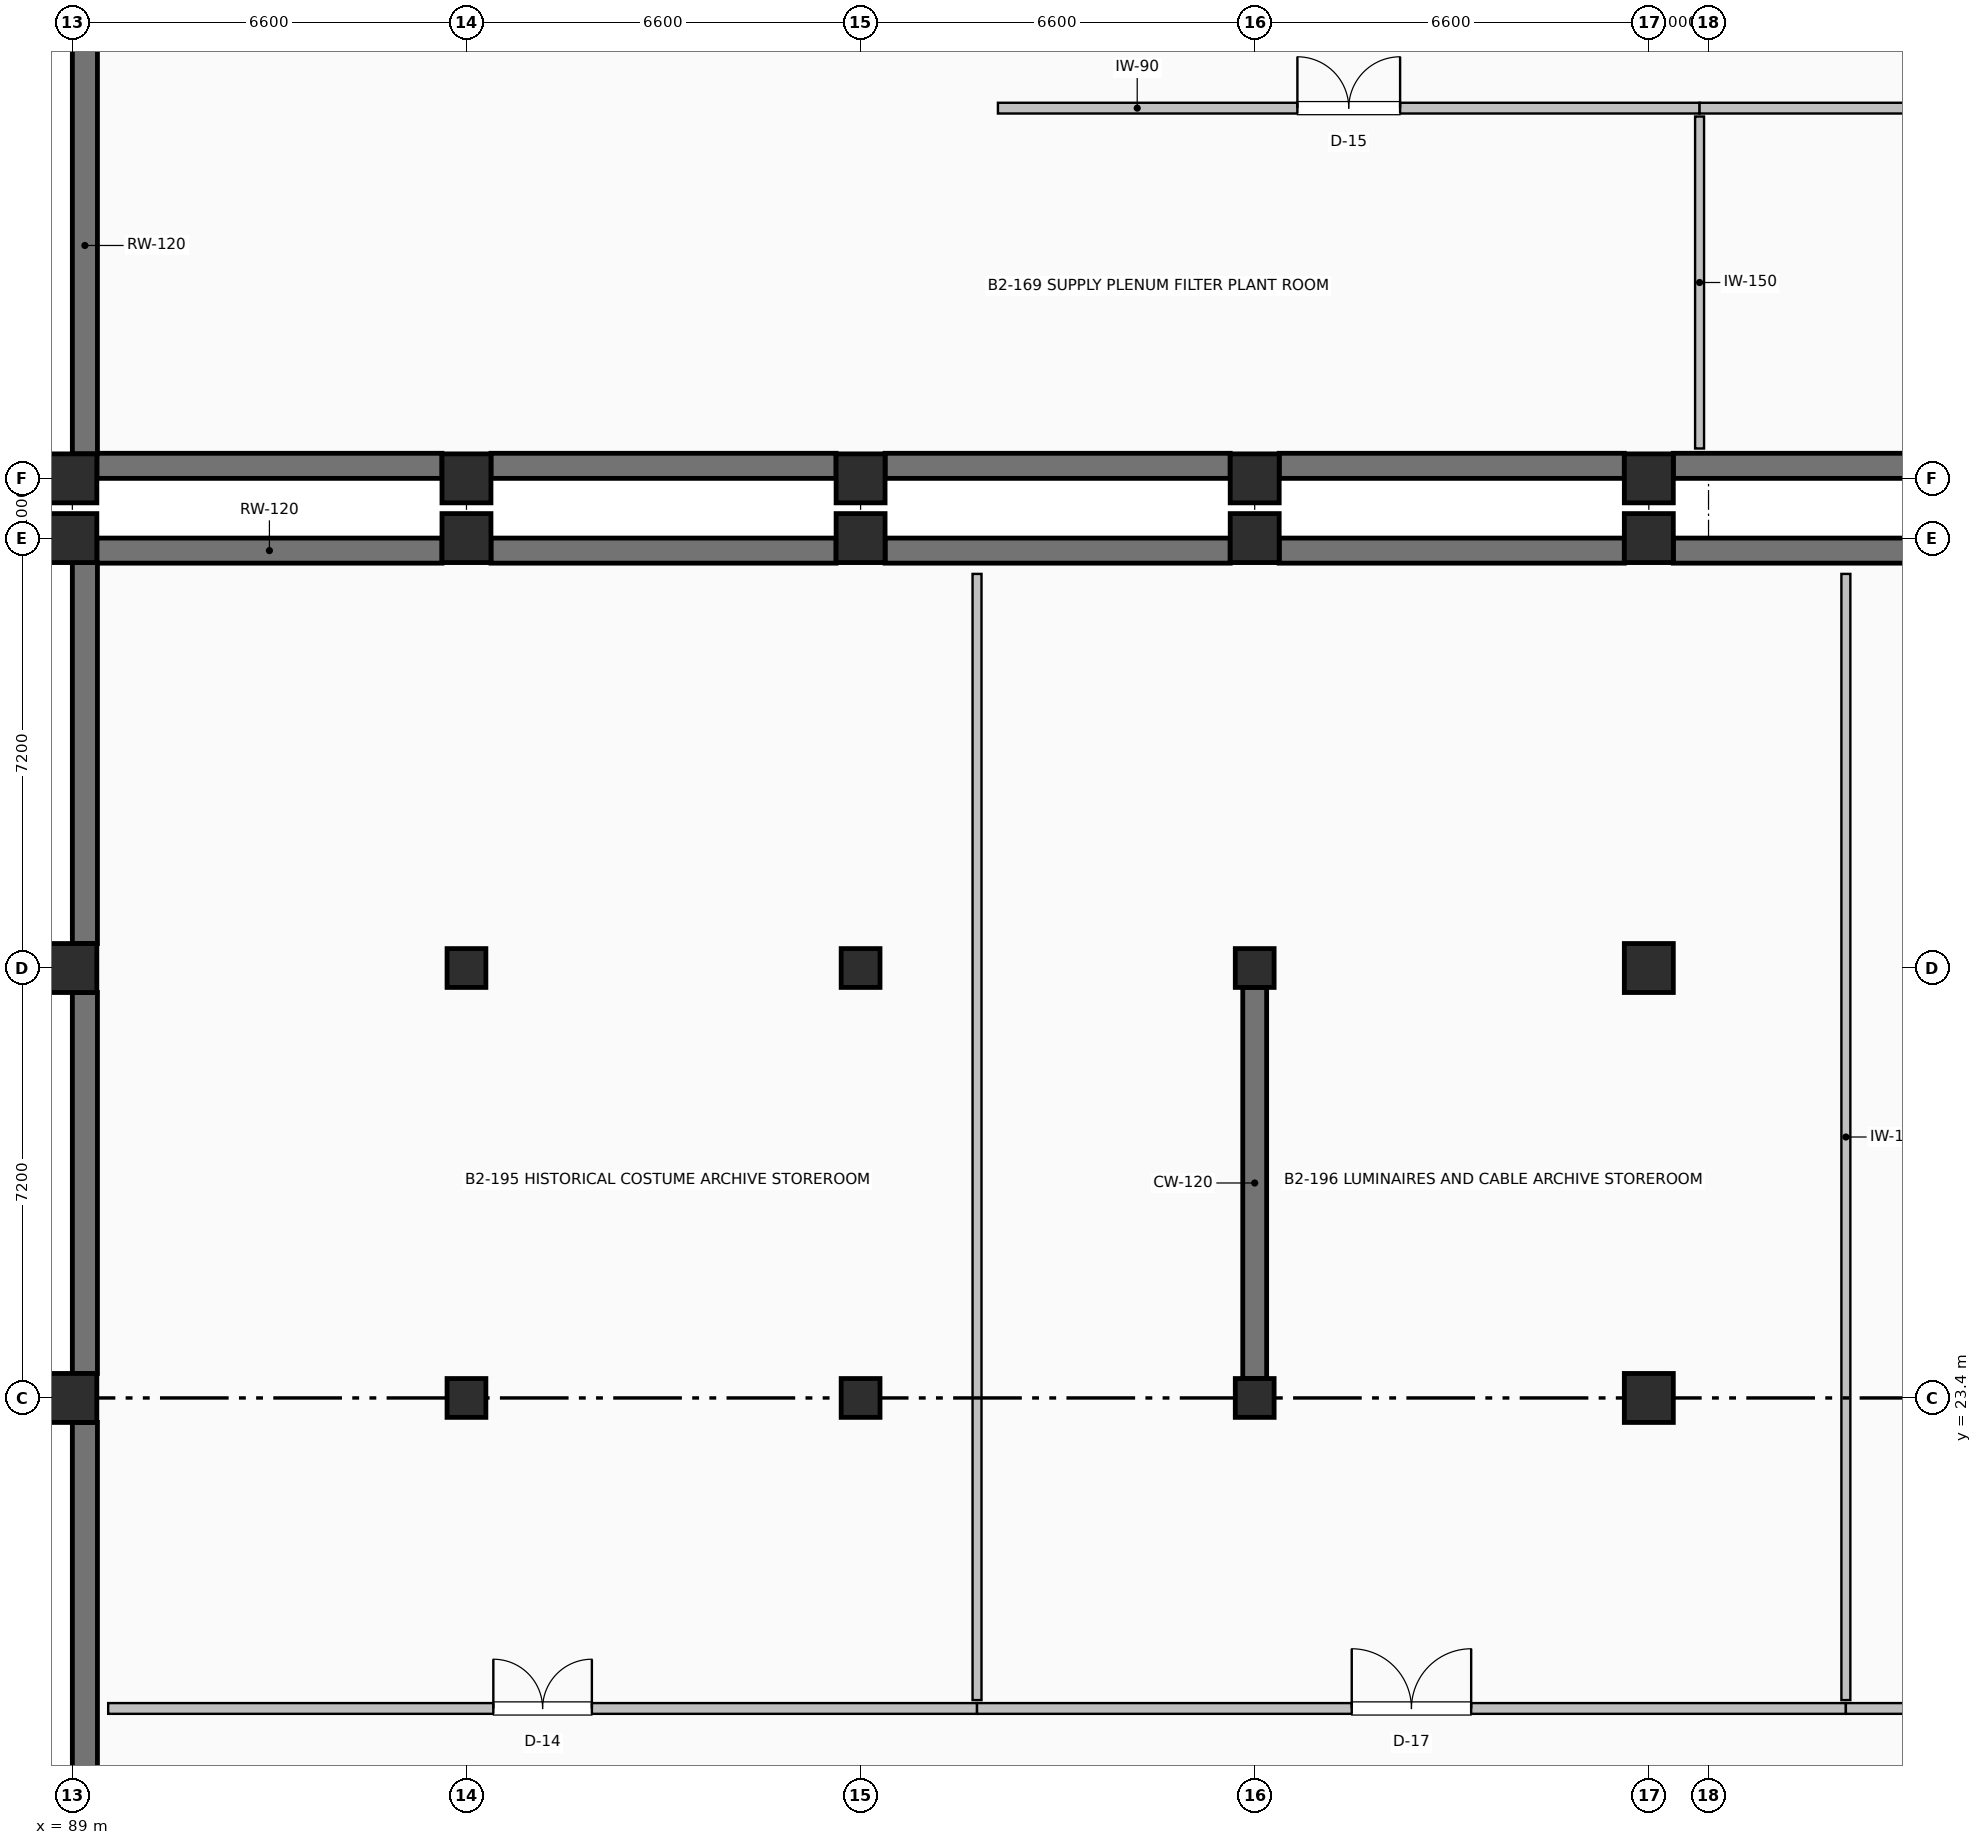
"""IFC4 building model, lengths in metres.
Left out: names, types, materials, properties, quantities, classifications, styles, units other than length and angle.
Written with IfcOpenShell. Run it as: python <this file> out.ifc"""

import sys

from ifc_helpers import new_model, si_unit, direction, frame, frame_2d, origin, origin_2d, place, context, subcontext, project, spatial, rectangle, extrude, element, fill, save


model = new_model("IFC4")
c1 = context("Model", 3, precision=1e-05, world=origin(), true_north=direction((0.0, 1.0)))
c2 = subcontext(c1, "Body", "Model", "MODEL_VIEW")
j1 = project(units=[si_unit("LENGTHUNIT", "METRE"), si_unit("PLANEANGLEUNIT", "RADIAN")], contexts=[c1])
p1 = place(None, origin())
s1 = spatial("IfcSite", under=j1, at=p1, CompositionType="ELEMENT")
p2 = place(p1, origin())
s2 = spatial("IfcBuilding", under=s1, at=p2, CompositionType="ELEMENT")
p3 = place(p2, frame((0.0, 0.0, -9.6)))
s3 = spatial("IfcBuildingStorey", under=s2, at=p3, CompositionType="ELEMENT", Elevation=-9.6)
for number, where, z_axis, x_axis in (
    (1, (89.0, 38.8, 0.0), (0.0, 0.0, 1.0), (1.0, 0.0, 0.0)),
    (2, (95.6, 38.8, 0.0), (0.0, 0.0, 1.0), (1.0, 0.0, 0.0)),
    (3, (102.2, 38.8, 0.0), (0.0, 0.0, 1.0), (1.0, 0.0, 0.0)),
    (4, (108.8, 38.8, 0.0), (0.0, 0.0, 1.0), (1.0, 0.0, 0.0)),
    (5, (115.4, 38.8, 0.0), (0.0, 0.0, 1.0), (1.0, 0.0, 0.0)),
    (6, (89.0, 23.4, 0.0), (0.0, 0.0, 1.0), (1.0, 0.0, 0.0)),
    (7, (89.0, 30.6, 0.0), (0.0, 0.0, 1.0), (1.0, 0.0, 0.0)),
    (8, (89.0, 37.8, 0.0), (0.0, 0.0, 1.0), (1.0, 0.0, 0.0)),
):
    element("IfcColumn", number, at=place(p3, frame(where, z_axis=z_axis, x_axis=x_axis)), inside=s3, PredefinedType="COLUMN", context=c2, shape_type="SweptSolid", body=[
        extrude(rectangle(XDim=0.82, YDim=0.82, at=origin_2d()), origin(), (0.0, 0.0, 1.0), 4.8),
    ])
for number, where, z_axis, x_axis in (
    (9, (95.6, 23.4, 0.0), (0.0, 0.0, 1.0), (1.0, 0.0, 0.0)),
    (10, (95.6, 30.6, 0.0), (0.0, 0.0, 1.0), (1.0, 0.0, 0.0)),
):
    element("IfcColumn", number, at=place(p3, frame(where, z_axis=z_axis, x_axis=x_axis)), inside=s3, PredefinedType="COLUMN", context=c2, shape_type="SweptSolid", body=[
        extrude(rectangle(XDim=0.65, YDim=0.65, at=origin_2d()), origin(), (0.0, 0.0, 1.0), 4.8),
    ])
p4 = place(p3, frame((95.6, 37.8, 0.0), z_axis=(0.0, 0.0, 1.0), x_axis=(1.0, 0.0, 0.0)))
e11 = element("IfcColumn", 11, at=p4, inside=s3, PredefinedType="COLUMN", context=c2, shape_type="SweptSolid", body=[
    extrude(rectangle(XDim=0.82, YDim=0.82, at=origin_2d()), origin(), (0.0, 0.0, 1.0), 4.8),
])
for number, where, z_axis, x_axis in (
    (12, (102.2, 23.4, 0.0), (0.0, 0.0, 1.0), (1.0, 0.0, 0.0)),
    (13, (102.2, 30.6, 0.0), (0.0, 0.0, 1.0), (1.0, 0.0, 0.0)),
):
    element("IfcColumn", number, at=place(p3, frame(where, z_axis=z_axis, x_axis=x_axis)), inside=s3, PredefinedType="COLUMN", context=c2, shape_type="SweptSolid", body=[
        extrude(rectangle(XDim=0.65, YDim=0.65, at=origin_2d()), origin(), (0.0, 0.0, 1.0), 4.8),
    ])
p5 = place(p3, frame((102.2, 37.8, 0.0), z_axis=(0.0, 0.0, 1.0), x_axis=(1.0, 0.0, 0.0)))
e14 = element("IfcColumn", 14, at=p5, inside=s3, PredefinedType="COLUMN", context=c2, shape_type="SweptSolid", body=[
    extrude(rectangle(XDim=0.82, YDim=0.82, at=origin_2d()), origin(), (0.0, 0.0, 1.0), 4.8),
])
for number, where, z_axis, x_axis in (
    (15, (108.8, 23.4, 0.0), (0.0, 0.0, 1.0), (1.0, 0.0, 0.0)),
    (16, (108.8, 30.6, 0.0), (0.0, 0.0, 1.0), (1.0, 0.0, 0.0)),
):
    element("IfcColumn", number, at=place(p3, frame(where, z_axis=z_axis, x_axis=x_axis)), inside=s3, PredefinedType="COLUMN", context=c2, shape_type="SweptSolid", body=[
        extrude(rectangle(XDim=0.65, YDim=0.65, at=origin_2d()), origin(), (0.0, 0.0, 1.0), 4.8),
    ])
for number, where, z_axis, x_axis in (
    (17, (108.8, 37.8, 0.0), (0.0, 0.0, 1.0), (1.0, 0.0, 0.0)),
    (18, (115.4, 23.4, 0.0), (0.0, 0.0, 1.0), (1.0, 0.0, 0.0)),
    (19, (115.4, 30.6, 0.0), (0.0, 0.0, 1.0), (1.0, 0.0, 0.0)),
    (20, (115.4, 37.8, 0.0), (0.0, 0.0, 1.0), (1.0, 0.0, 0.0)),
):
    element("IfcColumn", number, at=place(p3, frame(where, z_axis=z_axis, x_axis=x_axis)), inside=s3, PredefinedType="COLUMN", context=c2, shape_type="SweptSolid", body=[
        extrude(rectangle(XDim=0.82, YDim=0.82, at=origin_2d()), origin(), (0.0, 0.0, 1.0), 4.8),
    ])
p6 = place(p3, frame((108.8, 23.725, 0.0), z_axis=(0.0, 0.0, 1.0), x_axis=(0.0, 1.0, 0.0)))
e21 = element("IfcWall", 21, at=p6, inside=s3, PredefinedType="SHEAR", context=c2, shape_type="SweptSolid", body=[
    extrude(rectangle(XDim=6.55, YDim=0.4, at=frame_2d((3.275, 0.0))), origin(), (0.0, 0.0, 1.0), 4.48),
])
for number, where, z_axis, x_axis in (
    (22, (121.59, 39.01, 0.0), (0.0, 0.0, 1.0), (-1.0, 0.0, 0.0)),
    (23, (114.99, 39.01, 0.0), (0.0, 0.0, 1.0), (-1.0, 0.0, 0.0)),
):
    element("IfcWall", number, at=place(p3, frame(where, z_axis=z_axis, x_axis=x_axis)), inside=s3, PredefinedType="SHEAR", context=c2, shape_type="SweptSolid", body=[
        extrude(rectangle(XDim=5.78, YDim=0.42, at=frame_2d((2.89, 0.0))), origin(), (0.0, 0.0, 1.0), 4.5),
    ])
p7 = place(p3, frame((108.39, 39.01, 0.0), z_axis=(0.0, 0.0, 1.0), x_axis=(-1.0, 0.0, 0.0)))
e24 = element("IfcWall", 24, at=p7, inside=s3, PredefinedType="SHEAR", context=c2, shape_type="SweptSolid", body=[
    extrude(rectangle(XDim=5.78, YDim=0.42, at=frame_2d((2.89, 0.0))), origin(), (0.0, 0.0, 1.0), 4.5),
])
for number, where, z_axis, x_axis in (
    (25, (101.79, 39.01, 0.0), (0.0, 0.0, 1.0), (-1.0, 0.0, 0.0)),
    (26, (95.19, 39.01, 0.0), (0.0, 0.0, 1.0), (-1.0, 0.0, 0.0)),
):
    element("IfcWall", number, at=place(p3, frame(where, z_axis=z_axis, x_axis=x_axis)), inside=s3, PredefinedType="SHEAR", context=c2, shape_type="SweptSolid", body=[
        extrude(rectangle(XDim=5.78, YDim=0.42, at=frame_2d((2.89, 0.0))), origin(), (0.0, 0.0, 1.0), 4.5),
    ])
p8 = place(p3, frame((89.21, 39.21, 0.0), z_axis=(0.0, 0.0, 1.0), x_axis=(0.0, 1.0, 0.0)))
e27 = element("IfcWall", 27, at=p8, inside=s3, PredefinedType="SHEAR", context=c2, shape_type="SweptSolid", body=[
    extrude(rectangle(XDim=6.98, YDim=0.42, at=frame_2d((3.49, 0.0))), origin(), (0.0, 0.0, 1.0), 4.5),
])
for number, where, z_axis, x_axis in (
    (28, (89.41, 37.59, 0.0), (0.0, 0.0, 1.0), (1.0, 0.0, 0.0)),
    (29, (96.01, 37.59, 0.0), (0.0, 0.0, 1.0), (1.0, 0.0, 0.0)),
):
    element("IfcWall", number, at=place(p3, frame(where, z_axis=z_axis, x_axis=x_axis)), inside=s3, PredefinedType="SHEAR", context=c2, shape_type="SweptSolid", body=[
        extrude(rectangle(XDim=5.78, YDim=0.42, at=frame_2d((2.89, 0.0))), origin(), (0.0, 0.0, 1.0), 4.5),
    ])
p9 = place(p3, frame((102.61, 37.59, 0.0), z_axis=(0.0, 0.0, 1.0), x_axis=(1.0, 0.0, 0.0)))
e30 = element("IfcWall", 30, at=p9, inside=s3, PredefinedType="SHEAR", context=c2, shape_type="SweptSolid", body=[
    extrude(rectangle(XDim=5.78, YDim=0.42, at=frame_2d((2.89, 0.0))), origin(), (0.0, 0.0, 1.0), 4.5),
])
for number, where, z_axis, x_axis in (
    (31, (109.21, 37.59, 0.0), (0.0, 0.0, 1.0), (1.0, 0.0, 0.0)),
    (32, (115.81, 37.59, 0.0), (0.0, 0.0, 1.0), (1.0, 0.0, 0.0)),
):
    element("IfcWall", number, at=place(p3, frame(where, z_axis=z_axis, x_axis=x_axis)), inside=s3, PredefinedType="SHEAR", context=c2, shape_type="SweptSolid", body=[
        extrude(rectangle(XDim=5.78, YDim=0.42, at=frame_2d((2.89, 0.0))), origin(), (0.0, 0.0, 1.0), 4.5),
    ])
for number, where, z_axis, x_axis in (
    (33, (89.21, 16.61, 0.0), (0.0, 0.0, 1.0), (0.0, 1.0, 0.0)),
    (34, (89.21, 23.81, 0.0), (0.0, 0.0, 1.0), (0.0, 1.0, 0.0)),
    (35, (89.21, 31.01, 0.0), (0.0, 0.0, 1.0), (0.0, 1.0, 0.0)),
):
    element("IfcWall", number, at=place(p3, frame(where, z_axis=z_axis, x_axis=x_axis)), inside=s3, PredefinedType="SHEAR", context=c2, shape_type="SweptSolid", body=[
        extrude(rectangle(XDim=6.38, YDim=0.42, at=frame_2d((3.19, 0.0))), origin(), (0.0, 0.0, 1.0), 4.5),
    ])
p10 = place(p3, frame((104.5, 45.0, 0.0), z_axis=(0.0, 0.0, 1.0), x_axis=(1.0, 0.0, 0.0)))
e36 = element("IfcWall", 36, at=p10, inside=s3, PredefinedType="PARTITIONING", context=c2, shape_type="SweptSolid", body=[
    extrude(rectangle(XDim=11.75, YDim=0.18, at=frame_2d((5.875, 0.0))), origin(), (0.0, 0.0, 1.0), 4.492),
])
p11 = place(p10, frame((5.015, 0.0, 0.0)))
e37 = element("IfcOpeningElement", 37, at=p11, cuts=e36, PredefinedType="OPENING", context=c2, shape_type="SweptSolid", body=[
    extrude(rectangle(XDim=1.72, YDim=2.22, at=frame_2d((0.86, 1.11))), frame((0.0, 0.1, 0.0), z_axis=(0.0, -1.0, 0.0), x_axis=(1.0, 0.0, 0.0)), (0.0, 0.0, 1.0), 0.2),
])
p12 = place(p3, frame((116.25, 39.3, 0.0), z_axis=(0.0, 0.0, 1.0), x_axis=(0.0, 1.0, 0.0)))
e38 = element("IfcWall", 38, at=p12, inside=s3, PredefinedType="PARTITIONING", context=c2, shape_type="SweptSolid", body=[
    extrude(rectangle(XDim=5.56, YDim=0.15, at=frame_2d((2.78, 0.0))), origin(), (0.0, 0.0, 1.0), 4.492),
])
p13 = place(p3, frame((116.25, 45.0, 0.0), z_axis=(0.0, 0.0, 1.0), x_axis=(1.0, 0.0, 0.0)))
e39 = element("IfcWall", 39, at=p13, inside=s3, PredefinedType="PARTITIONING", context=c2, shape_type="SweptSolid", body=[
    extrude(rectangle(XDim=11.75, YDim=0.18, at=frame_2d((5.875, 0.0))), origin(), (0.0, 0.0, 1.0), 4.492),
])
p14 = place(p13, frame((3.594, 0.0, 0.0)))
e40 = element("IfcOpeningElement", 40, at=p14, cuts=e39, PredefinedType="OPENING", context=c2, shape_type="SweptSolid", body=[
    extrude(rectangle(XDim=1.4, YDim=2.12, at=frame_2d((0.7, 1.06))), frame((0.0, 0.1, 0.0), z_axis=(0.0, -1.0, 0.0), x_axis=(1.0, 0.0, 0.0)), (0.0, 0.0, 1.0), 0.2),
])
p15 = place(p3, frame((89.6, 18.2, 0.0), z_axis=(0.0, 0.0, 1.0), x_axis=(1.0, 0.0, 0.0)))
e41 = element("IfcWall", 41, at=p15, inside=s3, PredefinedType="PARTITIONING", context=c2, shape_type="SweptSolid", body=[
    extrude(rectangle(XDim=14.55, YDim=0.18, at=frame_2d((7.275, 0.0))), origin(), (0.0, 0.0, 1.0), 4.492),
])
p16 = place(p15, frame((6.45, 0.0, 0.0)))
e42 = element("IfcOpeningElement", 42, at=p16, cuts=e41, PredefinedType="OPENING", context=c2, shape_type="SweptSolid", body=[
    extrude(rectangle(XDim=1.65, YDim=2.2, at=frame_2d((0.825, 1.1))), frame((0.0, 0.1, 0.0), z_axis=(0.0, -1.0, 0.0), x_axis=(1.0, 0.0, 0.0)), (0.0, 0.0, 1.0), 0.2),
])
p17 = place(p3, frame((104.15, 18.34, 0.0), z_axis=(0.0, 0.0, 1.0), x_axis=(0.0, 1.0, 0.0)))
e43 = element("IfcWall", 43, at=p17, inside=s3, PredefinedType="PARTITIONING", context=c2, shape_type="SweptSolid", body=[
    extrude(rectangle(XDim=18.86, YDim=0.15, at=frame_2d((9.43, 0.0))), origin(), (0.0, 0.0, 1.0), 4.492),
])
p18 = place(p3, frame((104.15, 18.2, 0.0), z_axis=(0.0, 0.0, 1.0), x_axis=(1.0, 0.0, 0.0)))
e44 = element("IfcWall", 44, at=p18, inside=s3, PredefinedType="PARTITIONING", context=c2, shape_type="SweptSolid", body=[
    extrude(rectangle(XDim=14.55, YDim=0.18, at=frame_2d((7.275, 0.0))), origin(), (0.0, 0.0, 1.0), 4.492),
])
p19 = place(p18, frame((6.275, 0.0, 0.0)))
e45 = element("IfcOpeningElement", 45, at=p19, cuts=e44, PredefinedType="OPENING", context=c2, shape_type="SweptSolid", body=[
    extrude(rectangle(XDim=2.0, YDim=2.28, at=frame_2d((1.0, 1.14))), frame((0.0, 0.1, 0.0), z_axis=(0.0, -1.0, 0.0), x_axis=(1.0, 0.0, 0.0)), (0.0, 0.0, 1.0), 0.2),
])
p20 = place(p3, frame((118.7, 18.34, 0.0), z_axis=(0.0, 0.0, 1.0), x_axis=(0.0, 1.0, 0.0)))
e46 = element("IfcWall", 46, at=p20, inside=s3, PredefinedType="PARTITIONING", context=c2, shape_type="SweptSolid", body=[
    extrude(rectangle(XDim=18.86, YDim=0.15, at=frame_2d((9.43, 0.0))), origin(), (0.0, 0.0, 1.0), 4.492),
])
p21 = place(p3, frame((118.7, 18.2, 0.0), z_axis=(0.0, 0.0, 1.0), x_axis=(1.0, 0.0, 0.0)))
e47 = element("IfcWall", 47, at=p21, inside=s3, PredefinedType="PARTITIONING", context=c2, shape_type="SweptSolid", body=[
    extrude(rectangle(XDim=14.55, YDim=0.18, at=frame_2d((7.275, 0.0))), origin(), (0.0, 0.0, 1.0), 4.492),
])
p22 = place(p21, frame((6.535, 0.0, 0.0)))
e48 = element("IfcOpeningElement", 48, at=p22, cuts=e47, PredefinedType="OPENING", context=c2, shape_type="SweptSolid", body=[
    extrude(rectangle(XDim=1.48, YDim=2.18, at=frame_2d((0.74, 1.09))), frame((0.0, 0.1, 0.0), z_axis=(0.0, -1.0, 0.0), x_axis=(1.0, 0.0, 0.0)), (0.0, 0.0, 1.0), 0.2),
])
p23 = place(p11, origin())
e49 = element("IfcDoor", 49, at=p23, inside=s3, OperationType="DOUBLE_DOOR_SINGLE_SWING", PredefinedType="DOOR", context=c2, shape_type="SweptSolid", body=[
    extrude(rectangle(XDim=1.72, YDim=2.22, at=frame_2d((0.86, 1.11))), frame((0.0, 0.025, 0.0), z_axis=(0.0, -1.0, 0.0), x_axis=(1.0, 0.0, 0.0)), (0.0, 0.0, 1.0), 0.05),
])
fill(e37, e49)
p24 = place(p16, origin())
e50 = element("IfcDoor", 50, at=p24, inside=s3, OperationType="DOUBLE_DOOR_SINGLE_SWING", PredefinedType="DOOR", context=c2, shape_type="SweptSolid", body=[
    extrude(rectangle(XDim=1.65, YDim=2.2, at=frame_2d((0.825, 1.1))), frame((0.0, 0.025, 0.0), z_axis=(0.0, -1.0, 0.0), x_axis=(1.0, 0.0, 0.0)), (0.0, 0.0, 1.0), 0.05),
])
fill(e42, e50)
p25 = place(p19, origin())
e51 = element("IfcDoor", 51, at=p25, inside=s3, OperationType="DOUBLE_DOOR_SINGLE_SWING", PredefinedType="DOOR", context=c2, shape_type="SweptSolid", body=[
    extrude(rectangle(XDim=2.0, YDim=2.28, at=frame_2d((1.0, 1.14))), frame((0.0, 0.025, 0.0), z_axis=(0.0, -1.0, 0.0), x_axis=(1.0, 0.0, 0.0)), (0.0, 0.0, 1.0), 0.05),
])
fill(e45, e51)
save(model, sys.argv[1])
